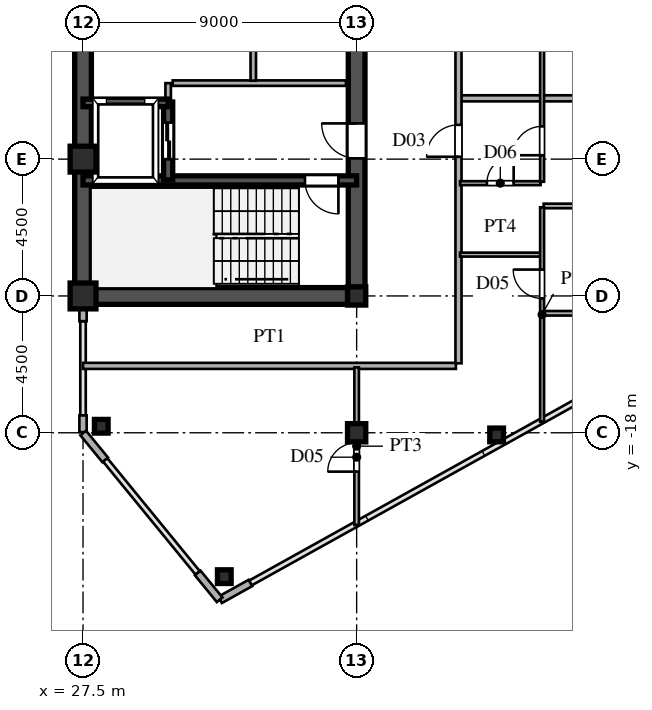
"""IFC4 building model, lengths in metres.
Left out: names, types, materials, properties, quantities, classifications, styles, units other than length and angle.
Written with IfcOpenShell. Run it as: python <this file> out.ifc"""

import sys

from ifc_helpers import new_model, si_unit, direction, frame, frame_2d, origin, origin_2d, place, context, subcontext, project, spatial, rectangle, hollow_rectangle, i_section, extrude, source, transform, mapped, element, fill, save


model = new_model("IFC4")
c1 = context("Model", 3, precision=1e-05, world=origin(), true_north=direction((0.0, 1.0)))
c2 = subcontext(c1, "Body", "Model", "MODEL_VIEW")
j1 = project(units=[si_unit("LENGTHUNIT", "METRE"), si_unit("PLANEANGLEUNIT", "RADIAN")], contexts=[c1])
p1 = place(None, origin())
s1 = spatial("IfcSite", under=j1, at=p1, CompositionType="ELEMENT")
p2 = place(p1, origin())
s2 = spatial("IfcBuilding", under=s1, at=p2, CompositionType="ELEMENT")
p3 = place(p2, frame((0.0, 0.0, 174.3)))
s3 = spatial("IfcBuildingStorey", under=s2, at=p3, CompositionType="ELEMENT", Elevation=174.3)
m1 = source(origin(), c2, "Body", "SweptSolid", [
    extrude(hollow_rectangle(XDim=0.85, YDim=0.85, WallThickness=0.036, at=origin_2d()), origin(), (0.0, 0.0, 1.0), 3.6),
])
for number, where, z_axis, x_axis in (
    (1, (27.5, -13.5, 0.0), (0.0, 0.0, 1.0), (1.0, 0.0, 0.0)),
    (2, (27.5, -9.0, 0.0), (0.0, 0.0, 1.0), (1.0, 0.0, 0.0)),
):
    element("IfcColumn", number, at=place(p3, frame(where, z_axis=z_axis, x_axis=x_axis)), inside=s3, PredefinedType="COLUMN", context=c2, shape_type="MappedRepresentation", body=[
        mapped(m1, transform((0.0, 0.0, 0.0), scale=1.0)),
    ])
m2 = source(origin(), c2, "Body", "SweptSolid", [
    extrude(i_section(OverallWidth=0.6, OverallDepth=0.6, WebThickness=0.025, FlangeThickness=0.04, at=origin_2d()), origin(), (0.0, 0.0, 1.0), 3.6),
])
for number, where, z_axis, x_axis in (
    (3, (36.5, -18.0, 0.0), (0.0, 0.0, 1.0), (1.0, 0.0, 0.0)),
    (4, (36.5, -13.5, 0.0), (0.0, 0.0, 1.0), (1.0, 0.0, 0.0)),
):
    element("IfcColumn", number, at=place(p3, frame(where, z_axis=z_axis, x_axis=x_axis)), inside=s3, PredefinedType="COLUMN", context=c2, shape_type="MappedRepresentation", body=[
        mapped(m2, transform((0.0, 0.0, 0.0), scale=1.0)),
    ])
m3 = source(origin(), c2, "Body", "SweptSolid", [
    extrude(hollow_rectangle(XDim=0.45, YDim=0.45, WallThickness=0.018, at=origin_2d()), origin(), (0.0, 0.0, 1.0), 3.6),
])
for number, where, z_axis, x_axis in (
    (5, (32.147, -22.732, 0.0), (0.0, 0.0, 1.0), (1.0, 0.0, 0.0)),
    (6, (28.1, -17.786, 0.0), (0.0, 0.0, 1.0), (1.0, 0.0, 0.0)),
    (7, (41.104, -18.071, 0.0), (0.0, 0.0, 1.0), (1.0, 0.0, 0.0)),
):
    element("IfcColumn", number, at=place(p3, frame(where, z_axis=z_axis, x_axis=x_axis)), inside=s3, PredefinedType="COLUMN", context=c2, shape_type="MappedRepresentation", body=[
        mapped(m3, transform((0.0, 0.0, 0.0), scale=1.0)),
    ])
p4 = place(p3, frame((32.009, -23.495, 0.0), z_axis=(0.0, 0.0, 1.0), x_axis=(0.87385402111, 0.486188389196, 0.0)))
e8 = element("IfcWall", 8, at=p4, inside=s3, PredefinedType="SOLIDWALL", context=c2, shape_type="SweptSolid", body=[
    extrude(rectangle(XDim=1.14, YDim=0.24, at=frame_2d((0.57, 0.0))), origin(), (0.0, 0.0, 1.0), 3.38),
])
p5 = place(p3, frame((27.5, -17.98, 0.0), z_axis=(0.0, 0.0, 1.0), x_axis=(0.0, 1.0, 0.0)))
e9 = element("IfcWall", 9, at=p5, inside=s3, PredefinedType="SOLIDWALL", context=c2, shape_type="SweptSolid", body=[
    extrude(rectangle(XDim=0.55, YDim=0.24, at=frame_2d((0.275, 0.0))), origin(), (0.0, 0.0, 1.0), 3.38),
])
p6 = place(p3, frame((27.5, -14.33, 0.0), z_axis=(0.0, 0.0, 1.0), x_axis=(0.0, 1.0, 0.0)))
e10 = element("IfcWall", 10, at=p6, inside=s3, PredefinedType="SOLIDWALL", context=c2, shape_type="SweptSolid", body=[
    extrude(rectangle(XDim=0.55, YDim=0.24, at=frame_2d((0.275, 0.0))), origin(), (0.0, 0.0, 1.0), 2.88),
])
for number, where, z_axis, x_axis in (
    (11, (27.506, -18.008, 0.0), (0.0, 0.0, 1.0), (0.633, -0.774, 0.0)),
    (12, (31.272, -22.61, 0.0), (0.0, 0.0, 1.0), (0.633, -0.774, 0.0)),
):
    element("IfcWall", number, at=place(p3, frame(where, z_axis=z_axis, x_axis=x_axis)), inside=s3, PredefinedType="SOLIDWALL", context=c2, shape_type="SweptSolid", body=[
        extrude(rectangle(XDim=1.14, YDim=0.24, at=frame_2d((0.57, 0.0))), origin(), (0.0, 0.0, 1.0), 3.38),
    ])
p7 = place(p3, frame((27.5, -13.5, 0.0), z_axis=(0.0, 0.0, 1.0), x_axis=(0.0, 1.0, 0.0)))
e13 = element("IfcWall", 13, at=p7, inside=s3, PredefinedType="SHEAR", context=c2, shape_type="SweptSolid", body=[
    extrude(rectangle(XDim=12.2, YDim=0.55, at=frame_2d((6.1, 0.0))), origin(), (0.0, 0.0, 1.0), 3.38),
])
p8 = place(p3, frame((27.5, -13.5, 0.0), z_axis=(0.0, 0.0, 1.0), x_axis=(1.0, 0.0, 0.0)))
e14 = element("IfcWall", 14, at=p8, inside=s3, PredefinedType="SHEAR", context=c2, shape_type="SweptSolid", body=[
    extrude(rectangle(XDim=9.0, YDim=0.55, at=frame_2d((4.5, 0.0))), origin(), (0.0, 0.0, 1.0), 3.38),
])
p9 = place(p3, frame((36.5, -13.65, 0.0), z_axis=(0.0, 0.0, 1.0), x_axis=(0.0, 1.0, 0.0)))
e15 = element("IfcWall", 15, at=p9, inside=s3, PredefinedType="SHEAR", context=c2, shape_type="SweptSolid", body=[
    extrude(rectangle(XDim=7.15, YDim=0.55, at=frame_2d((3.575, 0.0))), origin(), (0.0, 0.0, 1.0), 3.38),
])
p10 = place(p9, frame((4.675, 0.0, 0.0)))
e16 = element("IfcOpeningElement", 16, at=p10, cuts=e15, PredefinedType="OPENING", context=c2, shape_type="SweptSolid", body=[
    extrude(rectangle(XDim=1.15, YDim=2.2, at=frame_2d((0.575, 1.1))), frame((0.0, 0.285, 0.0), z_axis=(0.0, -1.0, 0.0), x_axis=(1.0, 0.0, 0.0)), (0.0, 0.0, 1.0), 0.57),
])
p11 = place(p3, frame((36.5, -6.5, 0.0), z_axis=(0.0, 0.0, 1.0), x_axis=(0.0, 1.0, 0.0)))
e17 = element("IfcWall", 17, at=p11, inside=s3, PredefinedType="SHEAR", context=c2, shape_type="SweptSolid", body=[
    extrude(rectangle(XDim=5.2, YDim=0.55, at=frame_2d((2.6, 0.0))), origin(), (0.0, 0.0, 1.0), 3.38),
])
p12 = place(p11, frame((2.125, 0.0, 0.0)))
e18 = element("IfcOpeningElement", 18, at=p12, cuts=e17, PredefinedType="OPENING", context=c2, shape_type="SweptSolid", body=[
    extrude(rectangle(XDim=0.95, YDim=2.15, at=frame_2d((0.475, 1.075))), frame((0.0, 0.285, 0.0), z_axis=(0.0, -1.0, 0.0), x_axis=(1.0, 0.0, 0.0)), (0.0, 0.0, 1.0), 0.57),
])
p13 = place(p3, frame((27.5, -9.7, 0.0), z_axis=(0.0, 0.0, 1.0), x_axis=(1.0, 0.0, 0.0)))
e19 = element("IfcWall", 19, at=p13, inside=s3, PredefinedType="SHEAR", context=c2, shape_type="SweptSolid", body=[
    extrude(rectangle(XDim=9.0, YDim=0.3, at=frame_2d((4.5, 0.0))), origin(), (0.0, 0.0, 1.0), 3.38),
])
p14 = place(p13, frame((7.3, 0.0, 0.0)))
e20 = element("IfcOpeningElement", 20, at=p14, cuts=e19, PredefinedType="OPENING", context=c2, shape_type="SweptSolid", body=[
    extrude(rectangle(XDim=1.1, YDim=2.2, at=frame_2d((0.55, 1.1))), frame((0.0, 0.16, 0.0), z_axis=(0.0, -1.0, 0.0), x_axis=(1.0, 0.0, 0.0)), (0.0, 0.0, 1.0), 0.32),
])
p15 = place(p3, frame((27.5, -7.15, 0.0), z_axis=(0.0, 0.0, 1.0), x_axis=(1.0, 0.0, 0.0)))
e21 = element("IfcWall", 21, at=p15, inside=s3, PredefinedType="SHEAR", context=c2, shape_type="SweptSolid", body=[
    extrude(rectangle(XDim=2.8, YDim=0.25, at=frame_2d((1.4, 0.0))), origin(), (0.0, 0.0, 1.0), 3.38),
])
p16 = place(p3, frame((30.3, -9.68, 0.0), z_axis=(0.0, 0.0, 1.0), x_axis=(0.0, 1.0, 0.0)))
e22 = element("IfcWall", 22, at=p16, inside=s3, PredefinedType="SHEAR", context=c2, shape_type="SweptSolid", body=[
    extrude(rectangle(XDim=2.56, YDim=0.3, at=frame_2d((1.28, 0.0))), origin(), (0.0, 0.0, 1.0), 3.38),
])
p17 = place(p16, frame((0.68, 0.0, 0.0)))
e23 = element("IfcOpeningElement", 23, at=p17, cuts=e22, PredefinedType="OPENING", context=c2, shape_type="SweptSolid", body=[
    extrude(rectangle(XDim=1.2, YDim=2.25, at=frame_2d((0.6, 1.125))), frame((0.0, 0.16, 0.0), z_axis=(0.0, -1.0, 0.0), x_axis=(1.0, 0.0, 0.0)), (0.0, 0.0, 1.0), 0.32),
])
p18 = place(p3, frame((30.45, -6.5, 0.0), z_axis=(0.0, 0.0, 1.0), x_axis=(1.0, 0.0, 0.0)))
e24 = element("IfcWall", 24, at=p18, inside=s3, PredefinedType="PARTITIONING", context=c2, shape_type="SweptSolid", body=[
    extrude(rectangle(XDim=5.7, YDim=0.18, at=frame_2d((2.85, 0.0))), origin(), (0.0, 0.0, 1.0), 3.38),
])
p19 = place(p3, frame((30.3, -7.12, 0.0), z_axis=(0.0, 0.0, 1.0), x_axis=(0.0, 1.0, 0.0)))
e25 = element("IfcWall", 25, at=p19, inside=s3, PredefinedType="PARTITIONING", context=c2, shape_type="SweptSolid", body=[
    extrude(rectangle(XDim=0.62, YDim=0.18, at=frame_2d((0.31, 0.0))), origin(), (0.0, 0.0, 1.0), 3.38),
])
p20 = place(p3, frame((33.1, -6.42, 0.0), z_axis=(0.0, 0.0, 1.0), x_axis=(0.0, 1.0, 0.0)))
e26 = element("IfcWall", 26, at=p20, inside=s3, PredefinedType="PARTITIONING", context=c2, shape_type="SweptSolid", body=[
    extrude(rectangle(XDim=5.04, YDim=0.18, at=frame_2d((2.52, 0.0))), origin(), (0.0, 0.0, 1.0), 3.38),
])
p21 = place(p3, frame((27.5, -15.8, 0.0), z_axis=(0.0, 0.0, 1.0), x_axis=(1.0, 0.0, 0.0)))
e27 = element("IfcWall", 27, at=p21, inside=s3, PredefinedType="PARTITIONING", context=c2, shape_type="SweptSolid", body=[
    extrude(rectangle(XDim=12.265, YDim=0.2, at=frame_2d((6.132, 0.0))), origin(), (0.0, 0.0, 1.0), 3.38),
])
p22 = place(p3, frame((42.65, -14.07, 0.0), z_axis=(0.0, 0.0, 1.0), x_axis=(1.0, 0.0, 0.0)))
e28 = element("IfcWall", 28, at=p22, inside=s3, PredefinedType="PARTITIONING", context=c2, shape_type="SweptSolid", body=[
    extrude(rectangle(XDim=6.341, YDim=0.15, at=frame_2d((3.17, 0.0))), origin(), (0.0, 0.0, 1.0), 3.38),
])
p23 = place(p22, frame((3.292, 0.0, 0.0)))
e29 = element("IfcOpeningElement", 29, at=p23, cuts=e28, PredefinedType="OPENING", context=c2, shape_type="SweptSolid", body=[
    extrude(rectangle(XDim=0.95, YDim=2.15, at=frame_2d((0.475, 1.075))), frame((0.0, 0.085, 0.0), z_axis=(0.0, -1.0, 0.0), x_axis=(1.0, 0.0, 0.0)), (0.0, 0.0, 1.0), 0.17),
])
p24 = place(p3, frame((39.9, -12.14, 0.0), z_axis=(0.0, 0.0, 1.0), x_axis=(1.0, 0.0, 0.0)))
e30 = element("IfcWall", 30, at=p24, inside=s3, PredefinedType="PARTITIONING", context=c2, shape_type="SweptSolid", body=[
    extrude(rectangle(XDim=2.65, YDim=0.13, at=frame_2d((1.325, 0.0))), origin(), (0.0, 0.0, 1.0), 3.38),
])
p25 = place(p3, frame((42.65, -10.54, 0.0), z_axis=(0.0, 0.0, 1.0), x_axis=(1.0, 0.0, 0.0)))
e31 = element("IfcWall", 31, at=p25, inside=s3, PredefinedType="PARTITIONING", context=c2, shape_type="SweptSolid", body=[
    extrude(rectangle(XDim=11.8, YDim=0.15, at=frame_2d((5.9, 0.0))), origin(), (0.0, 0.0, 1.0), 3.38),
])
p26 = place(p25, frame((5.425, 0.0, 0.0)))
e32 = element("IfcOpeningElement", 32, at=p26, cuts=e31, PredefinedType="OPENING", context=c2, shape_type="SweptSolid", body=[
    extrude(rectangle(XDim=0.95, YDim=2.15, at=frame_2d((0.475, 1.075))), frame((0.0, 0.085, 0.0), z_axis=(0.0, -1.0, 0.0), x_axis=(1.0, 0.0, 0.0)), (0.0, 0.0, 1.0), 0.17),
])
p27 = place(p3, frame((39.9, -9.79, 0.0), z_axis=(0.0, 0.0, 1.0), x_axis=(1.0, 0.0, 0.0)))
e33 = element("IfcWall", 33, at=p27, inside=s3, PredefinedType="PARTITIONING", context=c2, shape_type="SweptSolid", body=[
    extrude(rectangle(XDim=2.65, YDim=0.13, at=frame_2d((1.325, 0.0))), origin(), (0.0, 0.0, 1.0), 3.38),
])
p28 = place(p27, frame((0.885, 0.0, 0.0)))
e34 = element("IfcOpeningElement", 34, at=p28, cuts=e33, PredefinedType="OPENING", context=c2, shape_type="SweptSolid", body=[
    extrude(rectangle(XDim=0.88, YDim=2.1, at=frame_2d((0.44, 1.05))), frame((0.0, 0.075, 0.0), z_axis=(0.0, -1.0, 0.0), x_axis=(1.0, 0.0, 0.0)), (0.0, 0.0, 1.0), 0.15),
])
p29 = place(p3, frame((39.93, -7.0, 0.0), z_axis=(0.0, 0.0, 1.0), x_axis=(1.0, 0.0, 0.0)))
e35 = element("IfcWall", 35, at=p29, inside=s3, PredefinedType="PARTITIONING", context=c2, shape_type="SweptSolid", body=[
    extrude(rectangle(XDim=21.748, YDim=0.2, at=frame_2d((10.874, 0.0))), origin(), (0.0, 0.0, 1.0), 3.38),
])
p30 = place(p3, frame((36.5, -21.032, 0.0), z_axis=(0.0, 0.0, 1.0), x_axis=(0.0, 1.0, 0.0)))
e36 = element("IfcWall", 36, at=p30, inside=s3, PredefinedType="PARTITIONING", context=c2, shape_type="SweptSolid", body=[
    extrude(rectangle(XDim=5.182, YDim=0.15, at=frame_2d((2.591, 0.0))), origin(), (0.0, 0.0, 1.0), 2.78),
])
p31 = place(p30, frame((1.754, 0.0, 0.0)))
e37 = element("IfcOpeningElement", 37, at=p31, cuts=e36, PredefinedType="OPENING", context=c2, shape_type="SweptSolid", body=[
    extrude(rectangle(XDim=0.95, YDim=2.15, at=frame_2d((0.475, 1.075))), frame((0.0, 0.085, 0.0), z_axis=(0.0, -1.0, 0.0), x_axis=(1.0, 0.0, 0.0)), (0.0, 0.0, 1.0), 0.17),
])
p32 = place(p3, frame((39.85, -15.715, 0.0), z_axis=(0.0, 0.0, 1.0), x_axis=(0.0, 1.0, 0.0)))
e38 = element("IfcWall", 38, at=p32, inside=s3, PredefinedType="PARTITIONING", context=c2, shape_type="SweptSolid", body=[
    extrude(rectangle(XDim=31.43, YDim=0.2, at=frame_2d((15.715, 0.0))), origin(), (0.0, 0.0, 1.0), 3.38),
])
p33 = place(p32, frame((6.792, 0.0, 0.0)))
e39 = element("IfcOpeningElement", 39, at=p33, cuts=e38, PredefinedType="OPENING", context=c2, shape_type="SweptSolid", body=[
    extrude(rectangle(XDim=1.05, YDim=2.25, at=frame_2d((0.525, 1.125))), frame((0.0, 0.11, 0.0), z_axis=(0.0, -1.0, 0.0), x_axis=(1.0, 0.0, 0.0)), (0.0, 0.0, 1.0), 0.22),
])
p34 = place(p32, frame((14.98, 0.0, 0.0)))
e40 = element("IfcOpeningElement", 40, at=p34, cuts=e38, PredefinedType="OPENING", context=c2, shape_type="SweptSolid", body=[
    extrude(rectangle(XDim=1.05, YDim=2.25, at=frame_2d((0.525, 1.125))), frame((0.0, 0.11, 0.0), z_axis=(0.0, -1.0, 0.0), x_axis=(1.0, 0.0, 0.0)), (0.0, 0.0, 1.0), 0.22),
])
p35 = place(p32, frame((26.59, 0.0, 0.0)))
e41 = element("IfcOpeningElement", 41, at=p35, cuts=e38, PredefinedType="OPENING", context=c2, shape_type="SweptSolid", body=[
    extrude(rectangle(XDim=1.05, YDim=2.25, at=frame_2d((0.525, 1.125))), frame((0.0, 0.11, 0.0), z_axis=(0.0, -1.0, 0.0), x_axis=(1.0, 0.0, 0.0)), (0.0, 0.0, 1.0), 0.22),
])
p36 = place(p3, frame((42.6, -17.64, 0.0), z_axis=(0.0, 0.0, 1.0), x_axis=(0.0, 1.0, 0.0)))
e42 = element("IfcWall", 42, at=p36, inside=s3, PredefinedType="PARTITIONING", context=c2, shape_type="SweptSolid", body=[
    extrude(rectangle(XDim=7.055, YDim=0.13, at=frame_2d((3.527, 0.0))), origin(), (0.0, 0.0, 1.0), 3.38),
])
p37 = place(p36, frame((4.058, 0.0, 0.0)))
e43 = element("IfcOpeningElement", 43, at=p37, cuts=e42, PredefinedType="OPENING", context=c2, shape_type="SweptSolid", body=[
    extrude(rectangle(XDim=0.95, YDim=2.15, at=frame_2d((0.475, 1.075))), frame((0.0, 0.075, 0.0), z_axis=(0.0, -1.0, 0.0), x_axis=(1.0, 0.0, 0.0)), (0.0, 0.0, 1.0), 0.15),
])
p38 = place(p3, frame((42.6, -9.745, 0.0), z_axis=(0.0, 0.0, 1.0), x_axis=(0.0, 1.0, 0.0)))
e44 = element("IfcWall", 44, at=p38, inside=s3, PredefinedType="PARTITIONING", context=c2, shape_type="SweptSolid", body=[
    extrude(rectangle(XDim=12.028, YDim=0.13, at=frame_2d((6.014, 0.0))), origin(), (0.0, 0.0, 1.0), 3.38),
])
p39 = place(p38, frame((0.873, 0.0, 0.0)))
e45 = element("IfcOpeningElement", 45, at=p39, cuts=e44, PredefinedType="OPENING", context=c2, shape_type="SweptSolid", body=[
    extrude(rectangle(XDim=0.95, YDim=2.15, at=frame_2d((0.475, 1.075))), frame((0.0, 0.075, 0.0), z_axis=(0.0, -1.0, 0.0), x_axis=(1.0, 0.0, 0.0)), (0.0, 0.0, 1.0), 0.15),
])
p40 = place(p38, frame((9.27, 0.0, 0.0)))
e46 = element("IfcOpeningElement", 46, at=p40, cuts=e44, PredefinedType="OPENING", context=c2, shape_type="SweptSolid", body=[
    extrude(rectangle(XDim=0.95, YDim=2.15, at=frame_2d((0.475, 1.075))), frame((0.0, 0.075, 0.0), z_axis=(0.0, -1.0, 0.0), x_axis=(1.0, 0.0, 0.0)), (0.0, 0.0, 1.0), 0.15),
])
m4 = source(origin(), c2, "Body", "SweptSolid", [
    extrude(rectangle(XDim=1.15, YDim=2.2, at=frame_2d((0.575, 1.1))), frame((0.0, 0.025, 0.0), z_axis=(0.0, -1.0, 0.0), x_axis=(1.0, 0.0, 0.0)), (0.0, 0.0, 1.0), 0.05),
])
p41 = place(p10, origin())
e47 = element("IfcDoor", 47, at=p41, inside=s3, OperationType="SINGLE_SWING_RIGHT", PredefinedType="DOOR", context=c2, shape_type="MappedRepresentation", body=[
    mapped(m4, transform((0.0, 0.0, 0.0), scale=1.0)),
])
fill(e16, e47)
m5 = source(origin(), c2, "Body", "SweptSolid", [
    extrude(rectangle(XDim=1.1, YDim=2.2, at=frame_2d((0.55, 1.1))), frame((0.0, 0.025, 0.0), z_axis=(0.0, -1.0, 0.0), x_axis=(1.0, 0.0, 0.0)), (0.0, 0.0, 1.0), 0.05),
])
p42 = place(p14, frame((1.1, 0.0, 0.0), z_axis=(0.0, 0.0, 1.0), x_axis=(-1.0, 0.0, 0.0)))
e48 = element("IfcDoor", 48, at=p42, inside=s3, OperationType="SINGLE_SWING_RIGHT", PredefinedType="DOOR", context=c2, shape_type="MappedRepresentation", body=[
    mapped(m5, transform((0.0, 0.0, 0.0), scale=1.0)),
])
fill(e20, e48)
m6 = source(origin(), c2, "Body", "SweptSolid", [
    extrude(rectangle(XDim=1.2, YDim=2.25, at=frame_2d((0.6, 1.125))), frame((0.0, 0.025, 0.0), z_axis=(0.0, -1.0, 0.0), x_axis=(1.0, 0.0, 0.0)), (0.0, 0.0, 1.0), 0.05),
])
p43 = place(p17, origin())
e49 = element("IfcDoor", 49, at=p43, inside=s3, OperationType="DOUBLE_DOOR_SLIDING", PredefinedType="DOOR", context=c2, shape_type="MappedRepresentation", body=[
    mapped(m6, transform((0.0, 0.0, 0.0), scale=1.0)),
])
fill(e23, e49)
m7 = source(origin(), c2, "Body", "SweptSolid", [
    extrude(rectangle(XDim=0.88, YDim=2.1, at=frame_2d((0.44, 1.05))), frame((0.0, 0.025, 0.0), z_axis=(0.0, -1.0, 0.0), x_axis=(1.0, 0.0, 0.0)), (0.0, 0.0, 1.0), 0.05),
])
p44 = place(p28, origin())
e50 = element("IfcDoor", 50, at=p44, inside=s3, OperationType="SINGLE_SWING_RIGHT", PredefinedType="DOOR", context=c2, shape_type="MappedRepresentation", body=[
    mapped(m7, transform((0.0, 0.0, 0.0), scale=1.0)),
])
fill(e34, e50)
m8 = source(origin(), c2, "Body", "SweptSolid", [
    extrude(rectangle(XDim=0.95, YDim=2.15, at=frame_2d((0.475, 1.075))), frame((0.0, 0.025, 0.0), z_axis=(0.0, -1.0, 0.0), x_axis=(1.0, 0.0, 0.0)), (0.0, 0.0, 1.0), 0.05),
])
p45 = place(p31, origin())
e51 = element("IfcDoor", 51, at=p45, inside=s3, OperationType="SINGLE_SWING_LEFT", PredefinedType="DOOR", context=c2, shape_type="MappedRepresentation", body=[
    mapped(m8, transform((0.0, 0.0, 0.0), scale=1.0)),
])
fill(e37, e51)
m9 = source(origin(), c2, "Body", "SweptSolid", [
    extrude(rectangle(XDim=1.05, YDim=2.25, at=frame_2d((0.525, 1.125))), frame((0.0, 0.025, 0.0), z_axis=(0.0, -1.0, 0.0), x_axis=(1.0, 0.0, 0.0)), (0.0, 0.0, 1.0), 0.05),
])
p46 = place(p33, origin())
e52 = element("IfcDoor", 52, at=p46, inside=s3, OperationType="SINGLE_SWING_LEFT", PredefinedType="DOOR", context=c2, shape_type="MappedRepresentation", body=[
    mapped(m9, transform((0.0, 0.0, 0.0), scale=1.0)),
])
fill(e39, e52)
p47 = place(p37, origin())
e53 = element("IfcDoor", 53, at=p47, inside=s3, OperationType="SINGLE_SWING_RIGHT", PredefinedType="DOOR", context=c2, shape_type="MappedRepresentation", body=[
    mapped(m8, transform((0.0, 0.0, 0.0), scale=1.0)),
])
fill(e43, e53)
p48 = place(p39, origin())
e54 = element("IfcDoor", 54, at=p48, inside=s3, OperationType="SINGLE_SWING_LEFT", PredefinedType="DOOR", context=c2, shape_type="MappedRepresentation", body=[
    mapped(m8, transform((0.0, 0.0, 0.0), scale=1.0)),
])
fill(e45, e54)
save(model, sys.argv[1])
